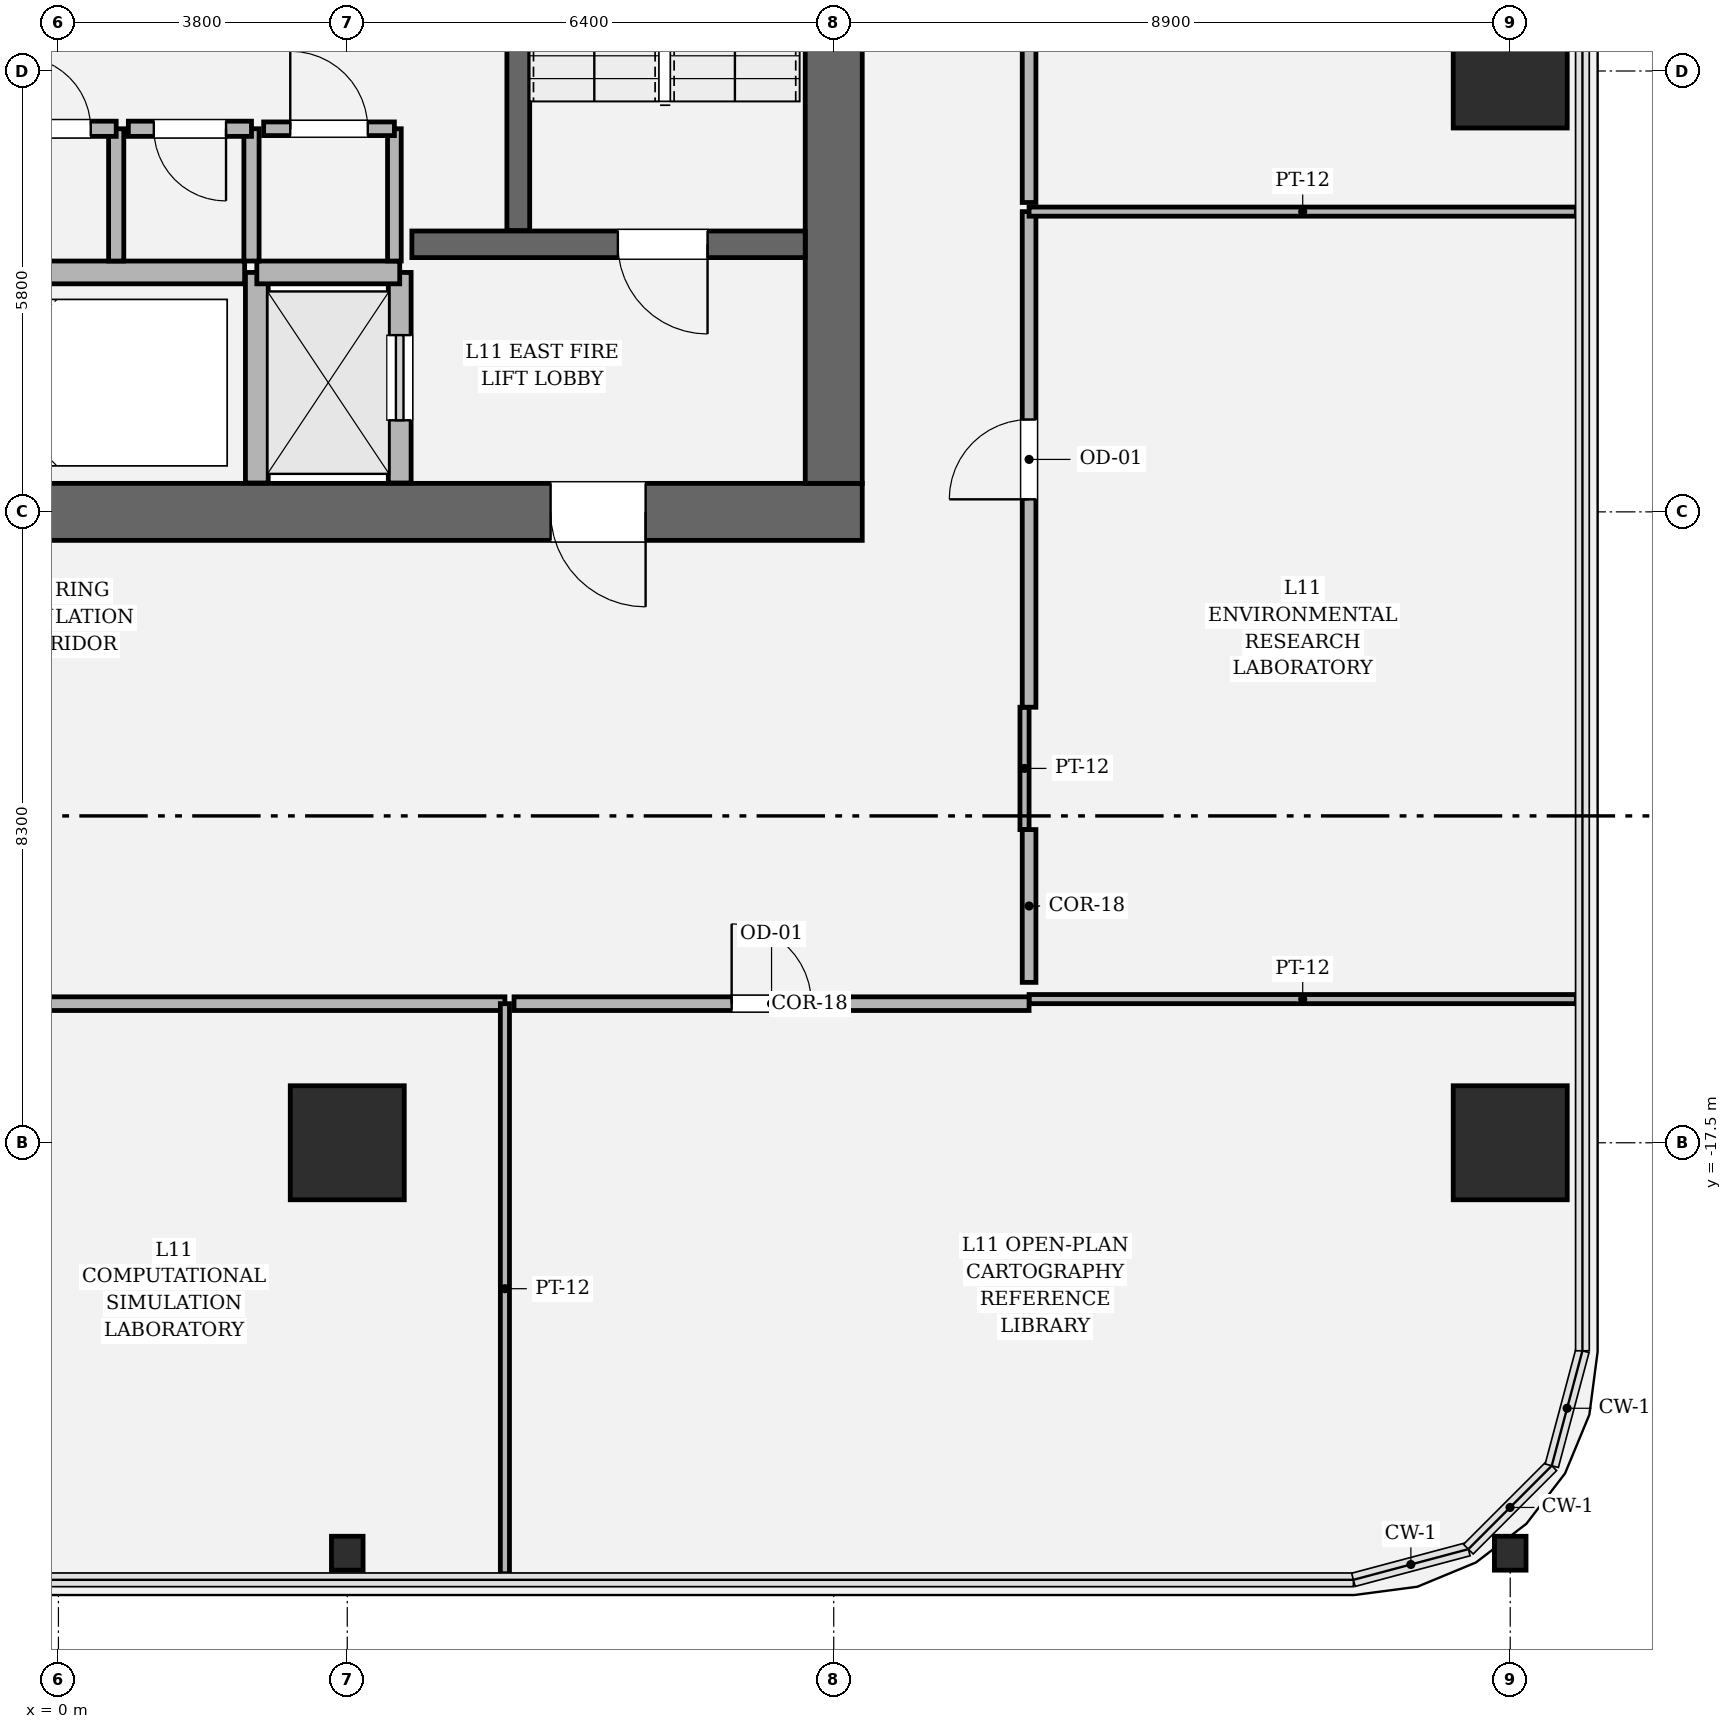
"""IFC4 building model, lengths in metres.
Left out: names, types, materials, properties, quantities, classifications, styles, units other than length and angle.
Written with IfcOpenShell. Run it as: python <this file> out.ifc"""

import sys

from ifc_helpers import new_model, si_unit, direction, frame, frame_2d, origin, origin_2d, place, context, subcontext, project, spatial, rectangle, hollow_rectangle, i_section, extrude, element, fill, save


model = new_model("IFC4")
c1 = context("Model", 3, precision=1e-05, world=origin(), true_north=direction((0.0, 1.0)))
c2 = subcontext(c1, "Body", "Model", "MODEL_VIEW")
j1 = project(units=[si_unit("LENGTHUNIT", "METRE"), si_unit("PLANEANGLEUNIT", "RADIAN")], contexts=[c1])
p1 = place(None, origin())
s1 = spatial("IfcSite", under=j1, at=p1, CompositionType="ELEMENT")
p2 = place(p1, origin())
s2 = spatial("IfcBuilding", under=s1, at=p2, CompositionType="ELEMENT")
p3 = place(p2, frame((0.0, 0.0, 52.5)))
s3 = spatial("IfcBuildingStorey", under=s2, at=p3, CompositionType="ELEMENT", Elevation=52.5)
p4 = place(p3, frame((10.575, -9.2, 0.0), z_axis=(0.0, 0.0, 1.0), x_axis=(-1.0, 0.0, 0.0)))
e1 = element("IfcWall", 1, at=p4, inside=s3, PredefinedType="SHEAR", context=c2, shape_type="SweptSolid", body=[
    extrude(rectangle(XDim=21.15, YDim=0.75, at=frame_2d((10.575, 0.0))), origin(), (0.0, 0.0, 1.0), 4.05),
])
p5 = place(p4, frame((2.85, 0.0, 0.0)))
e2 = element("IfcOpeningElement", 2, at=p5, cuts=e1, PredefinedType="OPENING", context=c2, shape_type="SweptSolid", body=[
    extrude(rectangle(XDim=1.25, YDim=2.25, at=frame_2d((0.625, 1.125))), frame((0.0, 0.385, 0.0), z_axis=(0.0, -1.0, 0.0), x_axis=(1.0, 0.0, 0.0)), (0.0, 0.0, 1.0), 0.77),
])
p6 = place(p4, frame((17.05, 0.0, 0.0)))
e3 = element("IfcOpeningElement", 3, at=p6, cuts=e1, PredefinedType="OPENING", context=c2, shape_type="SweptSolid", body=[
    extrude(rectangle(XDim=1.25, YDim=2.25, at=frame_2d((0.625, 1.125))), frame((0.0, 0.385, 0.0), z_axis=(0.0, -1.0, 0.0), x_axis=(1.0, 0.0, 0.0)), (0.0, 0.0, 1.0), 0.77),
])
p7 = place(p3, frame((10.2, 8.825, 0.0), z_axis=(0.0, 0.0, 1.0), x_axis=(0.0, -1.0, 0.0)))
e4 = element("IfcWall", 4, at=p7, inside=s3, PredefinedType="SHEAR", context=c2, shape_type="SweptSolid", body=[
    extrude(rectangle(XDim=17.65, YDim=0.75, at=frame_2d((8.825, 0.0))), origin(), (0.0, 0.0, 1.0), 4.05),
])
p8 = place(p7, frame((3.855, 0.0, 0.0)))
e5 = element("IfcOpeningElement", 5, at=p8, cuts=e4, PredefinedType="OPENING", context=c2, shape_type="SweptSolid", body=[
    extrude(rectangle(XDim=1.18, YDim=2.2, at=frame_2d((0.59, 1.1))), frame((0.0, 0.385, 0.0), z_axis=(0.0, -1.0, 0.0), x_axis=(1.0, 0.0, 0.0)), (0.0, 0.0, 1.0), 0.77),
])
p9 = place(p3, frame((6.05, 3.45, 0.0), z_axis=(0.0, 0.0, 1.0), x_axis=(0.0, -1.0, 0.0)))
e6 = element("IfcWall", 6, at=p9, inside=s3, PredefinedType="SOLIDWALL", context=c2, shape_type="SweptSolid", body=[
    extrude(rectangle(XDim=8.95, YDim=0.3, at=frame_2d((4.475, 0.0))), origin(), (0.0, 0.0, 1.0), 4.05),
])
p10 = place(p3, frame((4.65, -5.68, 0.0), z_axis=(0.0, 0.0, 1.0), x_axis=(1.0, 0.0, 0.0)))
e7 = element("IfcWall", 7, at=p10, inside=s3, PredefinedType="SOLIDWALL", context=c2, shape_type="SweptSolid", body=[
    extrude(rectangle(XDim=5.175, YDim=0.35, at=frame_2d((2.587, 0.0))), origin(), (0.0, 0.0, 1.0), 4.05),
])
p11 = place(p10, frame((2.71, 0.0, 0.0)))
e8 = element("IfcOpeningElement", 8, at=p11, cuts=e7, PredefinedType="OPENING", context=c2, shape_type="SweptSolid", body=[
    extrude(rectangle(XDim=1.18, YDim=2.2, at=frame_2d((0.59, 1.1))), frame((0.0, 0.185, 0.0), z_axis=(0.0, -1.0, 0.0), x_axis=(1.0, 0.0, 0.0)), (0.0, 0.0, 1.0), 0.37),
])
for number, where, z_axis, x_axis in (
    (9, (3.8, -17.5, 0.0), (0.0, 0.0, 1.0), (1.0, 0.0, 0.0)),
    (10, (19.1, -17.5, 0.0), (0.0, 0.0, 1.0), (1.0, 0.0, 0.0)),
    (11, (19.1, -3.4, 0.0), (0.0, 0.0, 1.0), (1.0, 0.0, 0.0)),
):
    element("IfcColumn", number, at=place(p3, frame(where, z_axis=z_axis, x_axis=x_axis)), inside=s3, PredefinedType="COLUMN", context=c2, shape_type="SweptSolid", body=[
        extrude(hollow_rectangle(XDim=1.5, YDim=1.5, WallThickness=0.045, at=origin_2d()), origin(), (0.0, 0.0, 1.0), 4.05),
    ])
for number, where, z_axis, x_axis in (
    (12, (3.8, -22.9, 0.0), (0.0, 0.0, 1.0), (1.0, 0.0, 0.0)),
    (13, (19.1, -22.9, 0.0), (0.0, 0.0, 1.0), (1.0, 0.0, 0.0)),
):
    element("IfcColumn", number, at=place(p3, frame(where, z_axis=z_axis, x_axis=x_axis)), inside=s3, PredefinedType="COLUMN", context=c2, shape_type="SweptSolid", body=[
        extrude(i_section(OverallWidth=0.416, OverallDepth=0.446, WebThickness=0.039, FlangeThickness=0.062, FilletRadius=0.018, at=origin_2d()), origin(), (0.0, 0.0, 1.0), 4.048),
    ])
p12 = place(p3, frame((4.49, -8.82, 0.0), z_axis=(0.0, 0.0, 1.0), x_axis=(0.0, 1.0, 0.0)))
e14 = element("IfcWall", 14, at=p12, inside=s3, PredefinedType="SOLIDWALL", context=c2, shape_type="SweptSolid", body=[
    extrude(rectangle(XDim=2.77, YDim=0.3, at=frame_2d((1.385, 0.0))), origin(), (0.0, 0.0, 1.0), 3.81),
])
p13 = place(p12, frame((0.825, 0.0, 0.0)))
e15 = element("IfcOpeningElement", 15, at=p13, cuts=e14, PredefinedType="OPENING", context=c2, shape_type="SweptSolid", body=[
    extrude(rectangle(XDim=1.12, YDim=2.25, at=frame_2d((0.56, 1.125))), frame((0.0, 0.16, 0.0), z_axis=(0.0, -1.0, 0.0), x_axis=(1.0, 0.0, 0.0)), (0.0, 0.0, 1.0), 0.32),
])
p14 = place(p3, frame((2.61, -8.82, 0.0), z_axis=(0.0, 0.0, 1.0), x_axis=(0.0, 1.0, 0.0)))
e16 = element("IfcWall", 16, at=p14, inside=s3, PredefinedType="SOLIDWALL", context=c2, shape_type="SweptSolid", body=[
    extrude(rectangle(XDim=2.77, YDim=0.3, at=frame_2d((1.385, 0.0))), origin(), (0.0, 0.0, 1.0), 3.81),
])
p15 = place(p3, frame((2.61, -6.05, 0.0), z_axis=(0.0, 0.0, 1.0), x_axis=(1.0, 0.0, 0.0)))
e17 = element("IfcWall", 17, at=p15, inside=s3, PredefinedType="SOLIDWALL", context=c2, shape_type="SweptSolid", body=[
    extrude(rectangle(XDim=1.88, YDim=0.3, at=frame_2d((0.94, 0.0))), origin(), (0.0, 0.0, 1.0), 3.81),
])
p16 = place(p3, frame((-2.45, -6.05, 0.0), z_axis=(0.0, 0.0, 1.0), x_axis=(1.0, 0.0, 0.0)))
e18 = element("IfcWall", 18, at=p16, inside=s3, PredefinedType="SOLIDWALL", context=c2, shape_type="SweptSolid", body=[
    extrude(rectangle(XDim=4.9, YDim=0.3, at=frame_2d((2.45, 0.0))), origin(), (0.0, 0.0, 1.0), 3.81),
])
p17 = place(p3, frame((0.76, -5.9, 0.0), z_axis=(0.0, 0.0, 1.0), x_axis=(0.0, 1.0, 0.0)))
e19 = element("IfcWall", 19, at=p17, inside=s3, PredefinedType="SOLIDWALL", context=c2, shape_type="SweptSolid", body=[
    extrude(rectangle(XDim=1.74, YDim=0.2, at=frame_2d((0.87, 0.0))), origin(), (0.0, 0.0, 1.0), 3.81),
])
p18 = place(p3, frame((0.76, -4.16, 0.0), z_axis=(0.0, 0.0, 1.0), x_axis=(-1.0, 0.0, 0.0)))
e20 = element("IfcWall", 20, at=p18, inside=s3, PredefinedType="SOLIDWALL", context=c2, shape_type="SweptSolid", body=[
    extrude(rectangle(XDim=1.62, YDim=0.2, at=frame_2d((0.81, 0.0))), origin(), (0.0, 0.0, 1.0), 3.81),
])
p19 = place(p18, frame((0.335, 0.0, 0.0)))
e21 = element("IfcOpeningElement", 21, at=p19, cuts=e20, PredefinedType="OPENING", context=c2, shape_type="SweptSolid", body=[
    extrude(rectangle(XDim=0.95, YDim=2.15, at=frame_2d((0.475, 1.075))), frame((0.0, 0.11, 0.0), z_axis=(0.0, -1.0, 0.0), x_axis=(1.0, 0.0, 0.0)), (0.0, 0.0, 1.0), 0.22),
])
p20 = place(p3, frame((2.54, -5.9, 0.0), z_axis=(0.0, 0.0, 1.0), x_axis=(0.0, 1.0, 0.0)))
e22 = element("IfcWall", 22, at=p20, inside=s3, PredefinedType="SOLIDWALL", context=c2, shape_type="SweptSolid", body=[
    extrude(rectangle(XDim=1.74, YDim=0.2, at=frame_2d((0.87, 0.0))), origin(), (0.0, 0.0, 1.0), 3.81),
])
p21 = place(p3, frame((2.54, -4.16, 0.0), z_axis=(0.0, 0.0, 1.0), x_axis=(-1.0, 0.0, 0.0)))
e23 = element("IfcWall", 23, at=p21, inside=s3, PredefinedType="SOLIDWALL", context=c2, shape_type="SweptSolid", body=[
    extrude(rectangle(XDim=1.62, YDim=0.2, at=frame_2d((0.81, 0.0))), origin(), (0.0, 0.0, 1.0), 3.81),
])
p22 = place(p21, frame((0.335, 0.0, 0.0)))
e24 = element("IfcOpeningElement", 24, at=p22, cuts=e23, PredefinedType="OPENING", context=c2, shape_type="SweptSolid", body=[
    extrude(rectangle(XDim=0.95, YDim=2.15, at=frame_2d((0.475, 1.075))), frame((0.0, 0.11, 0.0), z_axis=(0.0, -1.0, 0.0), x_axis=(1.0, 0.0, 0.0)), (0.0, 0.0, 1.0), 0.22),
])
p23 = place(p3, frame((4.42, -5.9, 0.0), z_axis=(0.0, 0.0, 1.0), x_axis=(0.0, 1.0, 0.0)))
e25 = element("IfcWall", 25, at=p23, inside=s3, PredefinedType="PARTITIONING", context=c2, shape_type="SweptSolid", body=[
    extrude(rectangle(XDim=1.74, YDim=0.18, at=frame_2d((0.87, 0.0))), origin(), (0.0, 0.0, 1.0), 3.81),
])
p24 = place(p3, frame((4.42, -4.16, 0.0), z_axis=(0.0, 0.0, 1.0), x_axis=(-1.0, 0.0, 0.0)))
e26 = element("IfcWall", 26, at=p24, inside=s3, PredefinedType="PARTITIONING", context=c2, shape_type="SweptSolid", body=[
    extrude(rectangle(XDim=1.72, YDim=0.18, at=frame_2d((0.86, 0.0))), origin(), (0.0, 0.0, 1.0), 3.81),
])
p25 = place(p24, frame((0.35, 0.0, 0.0)))
e27 = element("IfcOpeningElement", 27, at=p25, cuts=e26, PredefinedType="OPENING", context=c2, shape_type="SweptSolid", body=[
    extrude(rectangle(XDim=1.02, YDim=2.2, at=frame_2d((0.51, 1.1))), frame((0.0, 0.1, 0.0), z_axis=(0.0, -1.0, 0.0), x_axis=(1.0, 0.0, 0.0)), (0.0, 0.0, 1.0), 0.2),
])
p26 = place(p3, frame((-12.77, -15.67, 0.0), z_axis=(0.0, 0.0, 1.0), x_axis=(1.0, 0.0, 0.0)))
e28 = element("IfcWall", 28, at=p26, inside=s3, PredefinedType="PARTITIONING", context=c2, shape_type="SweptSolid", body=[
    extrude(rectangle(XDim=18.644, YDim=0.18, at=frame_2d((9.322, 0.0))), origin(), (0.0, 0.0, 1.0), 3.104),
])
p27 = place(p26, frame((10.147, 0.0, 0.0)))
e29 = element("IfcOpeningElement", 29, at=p27, cuts=e28, PredefinedType="OPENING", context=c2, shape_type="SweptSolid", body=[
    extrude(rectangle(XDim=1.05, YDim=2.2, at=frame_2d((0.525, 1.1))), frame((0.0, 0.1, 0.0), z_axis=(0.0, -1.0, 0.0), x_axis=(1.0, 0.0, 0.0)), (0.0, 0.0, 1.0), 0.2),
])
p28 = place(p3, frame((5.874, -15.67, 0.0), z_axis=(0.0, 0.0, 1.0), x_axis=(0.0, -1.0, 0.0)))
e30 = element("IfcWall", 30, at=p28, inside=s3, PredefinedType="PARTITIONING", context=c2, shape_type="SweptSolid", body=[
    extrude(rectangle(XDim=7.5, YDim=0.12, at=frame_2d((3.75, 0.0))), origin(), (0.0, 0.0, 1.0), 2.524),
])
p29 = place(p3, frame((12.77, -15.61, 0.0), z_axis=(0.0, 0.0, 1.0), x_axis=(1.0, 0.0, 0.0)))
e31 = element("IfcWall", 31, at=p29, inside=s3, PredefinedType="PARTITIONING", context=c2, shape_type="SweptSolid", body=[
    extrude(rectangle(XDim=7.2, YDim=0.12, at=frame_2d((3.6, 0.0))), origin(), (0.0, 0.0, 1.0), 3.104),
])
p30 = place(p3, frame((5.994, -15.67, 0.0), z_axis=(0.0, 0.0, 1.0), x_axis=(1.0, 0.0, 0.0)))
e32 = element("IfcWall", 32, at=p30, inside=s3, PredefinedType="PARTITIONING", context=c2, shape_type="SweptSolid", body=[
    extrude(rectangle(XDim=6.776, YDim=0.18, at=frame_2d((3.388, 0.0))), origin(), (0.0, 0.0, 1.0), 3.104),
])
p31 = place(p30, frame((2.863, 0.0, 0.0)))
e33 = element("IfcOpeningElement", 33, at=p31, cuts=e32, PredefinedType="OPENING", context=c2, shape_type="SweptSolid", body=[
    extrude(rectangle(XDim=1.05, YDim=2.2, at=frame_2d((0.525, 1.1))), frame((0.0, 0.1, 0.0), z_axis=(0.0, -1.0, 0.0), x_axis=(1.0, 0.0, 0.0)), (0.0, 0.0, 1.0), 0.2),
])
p32 = place(p3, frame((12.71, -13.38, 0.0), z_axis=(0.0, 0.0, 1.0), x_axis=(0.0, 1.0, 0.0)))
e34 = element("IfcWall", 34, at=p32, inside=s3, PredefinedType="PARTITIONING", context=c2, shape_type="SweptSolid", body=[
    extrude(rectangle(XDim=1.61, YDim=0.12, at=frame_2d((0.805, 0.0))), origin(), (0.0, 0.0, 1.0), 3.354),
])
p33 = place(p3, frame((12.77, -11.77, 0.0), z_axis=(0.0, 0.0, 1.0), x_axis=(0.0, 1.0, 0.0)))
e35 = element("IfcWall", 35, at=p33, inside=s3, PredefinedType="PARTITIONING", context=c2, shape_type="SweptSolid", body=[
    extrude(rectangle(XDim=6.52, YDim=0.18, at=frame_2d((3.26, 0.0))), origin(), (0.0, 0.0, 1.0), 3.104),
])
p34 = place(p33, frame((2.735, 0.0, 0.0)))
e36 = element("IfcOpeningElement", 36, at=p34, cuts=e35, PredefinedType="OPENING", context=c2, shape_type="SweptSolid", body=[
    extrude(rectangle(XDim=1.05, YDim=2.2, at=frame_2d((0.525, 1.1))), frame((0.0, 0.1, 0.0), z_axis=(0.0, -1.0, 0.0), x_axis=(1.0, 0.0, 0.0)), (0.0, 0.0, 1.0), 0.2),
])
p35 = place(p3, frame((12.77, -5.25, 0.0), z_axis=(0.0, 0.0, 1.0), x_axis=(1.0, 0.0, 0.0)))
e37 = element("IfcWall", 37, at=p35, inside=s3, PredefinedType="PARTITIONING", context=c2, shape_type="SweptSolid", body=[
    extrude(rectangle(XDim=7.2, YDim=0.12, at=frame_2d((3.6, 0.0))), origin(), (0.0, 0.0, 1.0), 3.104),
])
p36 = place(p3, frame((12.77, -15.39, 0.0), z_axis=(0.0, 0.0, 1.0), x_axis=(0.0, 1.0, 0.0)))
e38 = element("IfcWall", 38, at=p36, inside=s3, PredefinedType="PARTITIONING", context=c2, shape_type="SweptSolid", body=[
    extrude(rectangle(XDim=2.01, YDim=0.18, at=frame_2d((1.005, 0.0))), origin(), (0.0, 0.0, 1.0), 3.354),
])
p37 = place(p3, frame((12.77, -5.13, 0.0), z_axis=(0.0, 0.0, 1.0), x_axis=(0.0, 1.0, 0.0)))
e39 = element("IfcWall", 39, at=p37, inside=s3, PredefinedType="PARTITIONING", context=c2, shape_type="SweptSolid", body=[
    extrude(rectangle(XDim=7.98, YDim=0.18, at=frame_2d((3.99, 0.0))), origin(), (0.0, 0.0, 1.0), 3.104),
])
p38 = place(p37, frame((3.48, 0.0, 0.0)))
e40 = element("IfcOpeningElement", 40, at=p38, cuts=e39, PredefinedType="OPENING", context=c2, shape_type="SweptSolid", body=[
    extrude(rectangle(XDim=1.02, YDim=2.2, at=frame_2d((0.51, 1.1))), frame((0.0, 0.1, 0.0), z_axis=(0.0, -1.0, 0.0), x_axis=(1.0, 0.0, 0.0)), (0.0, 0.0, 1.0), 0.2),
])
p39 = place(p11, origin())
e41 = element("IfcDoor", 41, at=p39, inside=s3, OperationType="SINGLE_SWING_RIGHT", PredefinedType="DOOR", context=c2, shape_type="SweptSolid", body=[
    extrude(rectangle(XDim=1.18, YDim=2.2, at=frame_2d((0.59, 1.1))), frame((0.0, 0.025, 0.0), z_axis=(0.0, -1.0, 0.0), x_axis=(1.0, 0.0, 0.0)), (0.0, 0.0, 1.0), 0.05),
])
fill(e8, e41)
p40 = place(p5, origin())
e42 = element("IfcDoor", 42, at=p40, inside=s3, OperationType="SINGLE_SWING_LEFT", PredefinedType="DOOR", context=c2, shape_type="SweptSolid", body=[
    extrude(rectangle(XDim=1.25, YDim=2.25, at=frame_2d((0.625, 1.125))), frame((0.0, 0.025, 0.0), z_axis=(0.0, -1.0, 0.0), x_axis=(1.0, 0.0, 0.0)), (0.0, 0.0, 1.0), 0.05),
])
fill(e2, e42)
p41 = place(p13, origin())
e43 = element("IfcDoor", 43, at=p41, inside=s3, OperationType="SLIDING_TO_RIGHT", PredefinedType="DOOR", context=c2, shape_type="SweptSolid", body=[
    extrude(rectangle(XDim=1.12, YDim=2.25, at=frame_2d((0.56, 1.125))), frame((0.0, 0.025, 0.0), z_axis=(0.0, -1.0, 0.0), x_axis=(1.0, 0.0, 0.0)), (0.0, 0.0, 1.0), 0.05),
])
fill(e15, e43)
p42 = place(p19, origin())
e44 = element("IfcDoor", 44, at=p42, inside=s3, OperationType="SINGLE_SWING_RIGHT", PredefinedType="DOOR", context=c2, shape_type="SweptSolid", body=[
    extrude(rectangle(XDim=0.95, YDim=2.15, at=frame_2d((0.475, 1.075))), frame((0.0, 0.025, 0.0), z_axis=(0.0, -1.0, 0.0), x_axis=(1.0, 0.0, 0.0)), (0.0, 0.0, 1.0), 0.05),
])
fill(e21, e44)
p43 = place(p22, origin())
e45 = element("IfcDoor", 45, at=p43, inside=s3, OperationType="SINGLE_SWING_LEFT", PredefinedType="DOOR", context=c2, shape_type="SweptSolid", body=[
    extrude(rectangle(XDim=0.95, YDim=2.15, at=frame_2d((0.475, 1.075))), frame((0.0, 0.025, 0.0), z_axis=(0.0, -1.0, 0.0), x_axis=(1.0, 0.0, 0.0)), (0.0, 0.0, 1.0), 0.05),
])
fill(e24, e45)
p44 = place(p25, origin())
e46 = element("IfcDoor", 46, at=p44, inside=s3, OperationType="SINGLE_SWING_RIGHT", PredefinedType="DOOR", context=c2, shape_type="SweptSolid", body=[
    extrude(rectangle(XDim=1.02, YDim=2.2, at=frame_2d((0.51, 1.1))), frame((0.0, 0.025, 0.0), z_axis=(0.0, -1.0, 0.0), x_axis=(1.0, 0.0, 0.0)), (0.0, 0.0, 1.0), 0.05),
])
fill(e27, e46)
p45 = place(p31, origin())
e47 = element("IfcDoor", 47, at=p45, inside=s3, OperationType="SINGLE_SWING_LEFT", PredefinedType="DOOR", context=c2, shape_type="SweptSolid", body=[
    extrude(rectangle(XDim=1.05, YDim=2.2, at=frame_2d((0.525, 1.1))), frame((0.0, 0.025, 0.0), z_axis=(0.0, -1.0, 0.0), x_axis=(1.0, 0.0, 0.0)), (0.0, 0.0, 1.0), 0.05),
])
fill(e33, e47)
p46 = place(p34, origin())
e48 = element("IfcDoor", 48, at=p46, inside=s3, OperationType="SINGLE_SWING_LEFT", PredefinedType="DOOR", context=c2, shape_type="SweptSolid", body=[
    extrude(rectangle(XDim=1.05, YDim=2.2, at=frame_2d((0.525, 1.1))), frame((0.0, 0.025, 0.0), z_axis=(0.0, -1.0, 0.0), x_axis=(1.0, 0.0, 0.0)), (0.0, 0.0, 1.0), 0.05),
])
fill(e36, e48)
save(model, sys.argv[1])
